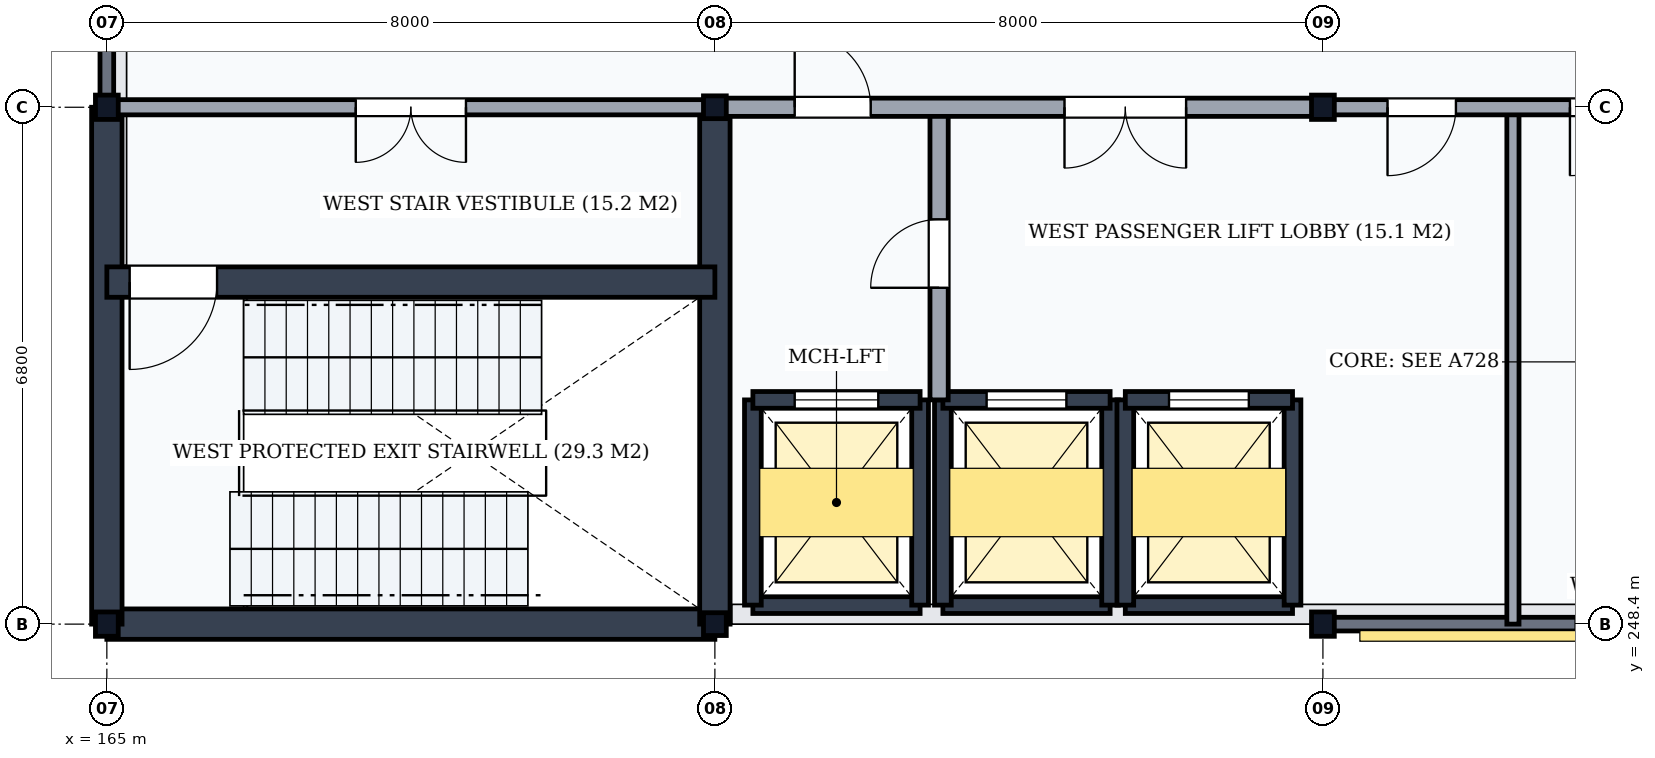
"""IFC4 building model, lengths in metres.
Left out: names, types, materials, properties, quantities, classifications, styles, units other than length and angle.
Written with IfcOpenShell. Run it as: python <this file> out.ifc"""

import sys

from ifc_helpers import new_model, si_unit, direction, frame, frame_2d, origin, origin_2d, place, context, subcontext, project, spatial, rectangle, i_section, extrude, element, fill, save


model = new_model("IFC4")
c1 = context("Model", 3, precision=1e-05, world=origin(), true_north=direction((0.0, 1.0)))
c2 = subcontext(c1, "Body", "Model", "MODEL_VIEW")
j1 = project(units=[si_unit("LENGTHUNIT", "METRE"), si_unit("PLANEANGLEUNIT", "RADIAN")], contexts=[c1])
p1 = place(None, origin())
s1 = spatial("IfcSite", under=j1, at=p1, CompositionType="ELEMENT")
p2 = place(p1, origin())
s2 = spatial("IfcBuilding", under=s1, at=p2, CompositionType="ELEMENT")
p3 = place(p2, frame((0.0, 0.0, 72.3)))
s3 = spatial("IfcBuildingStorey", under=s2, at=p3, CompositionType="ELEMENT", Elevation=72.3)
for number, where, z_axis, x_axis in (
    (1, (165.0, 248.4, 0.0), (0.0, 0.0, 1.0), (1.0, 0.0, 0.0)),
    (2, (165.0, 255.2, 0.0), (0.0, 0.0, 1.0), (1.0, 0.0, 0.0)),
):
    element("IfcColumn", number, at=place(p3, frame(where, z_axis=z_axis, x_axis=x_axis)), inside=s3, PredefinedType="COLUMN", context=c2, shape_type="SweptSolid", body=[
        extrude(i_section(OverallWidth=0.3, OverallDepth=0.32, WebThickness=0.011, FlangeThickness=0.021, FilletRadius=0.027, at=origin_2d()), origin(), (0.0, 0.0, 1.0), 5.4),
    ])
for number, where, z_axis, x_axis in (
    (3, (173.0, 248.4, 0.0), (0.0, 0.0, 1.0), (1.0, 0.0, 0.0)),
    (4, (173.0, 255.2, 0.0), (0.0, 0.0, 1.0), (1.0, 0.0, 0.0)),
):
    element("IfcColumn", number, at=place(p3, frame(where, z_axis=z_axis, x_axis=x_axis)), inside=s3, PredefinedType="COLUMN", context=c2, shape_type="SweptSolid", body=[
        extrude(i_section(OverallWidth=0.3, OverallDepth=0.3, WebThickness=0.011, FlangeThickness=0.019, FilletRadius=0.027, at=origin_2d()), origin(), (0.0, 0.0, 1.0), 5.4),
    ])
for number, where, z_axis, x_axis in (
    (5, (181.0, 248.4, 0.0), (0.0, 0.0, 1.0), (1.0, 0.0, 0.0)),
    (6, (181.0, 255.2, 0.0), (0.0, 0.0, 1.0), (1.0, 0.0, 0.0)),
):
    element("IfcColumn", number, at=place(p3, frame(where, z_axis=z_axis, x_axis=x_axis)), inside=s3, PredefinedType="COLUMN", context=c2, shape_type="SweptSolid", body=[
        extrude(i_section(OverallWidth=0.3, OverallDepth=0.32, WebThickness=0.011, FlangeThickness=0.021, FilletRadius=0.027, at=origin_2d()), origin(), (0.0, 0.0, 1.0), 5.4),
    ])
p4 = place(p3, frame((181.006, 248.4, 0.0), z_axis=(0.0, 0.0, 1.0), x_axis=(1.0, 0.0, 0.0)))
e7 = element("IfcWall", 7, at=p4, inside=s3, PredefinedType="SOLIDWALL", context=c2, shape_type="SweptSolid", body=[
    extrude(rectangle(XDim=7.988, YDim=0.18, at=frame_2d((3.994, 0.0))), origin(), (0.0, 0.0, 1.0), 4.838),
])
p5 = place(p4, frame((3.319, 0.0, 0.85)))
e8 = element("IfcOpeningElement", 8, at=p5, cuts=e7, PredefinedType="OPENING", context=c2, shape_type="SweptSolid", body=[
    extrude(rectangle(XDim=0.75, YDim=2.0, at=frame_2d((0.375, 1.0))), frame((0.0, 0.105, 0.0), z_axis=(0.0, -1.0, 0.0), x_axis=(1.0, 0.0, 0.0)), (0.0, 0.0, 1.0), 0.21),
])
p6 = place(p3, frame((165.0, 255.206, 0.0), z_axis=(0.0, 0.0, 1.0), x_axis=(0.0, 1.0, 0.0)))
e9 = element("IfcWall", 9, at=p6, inside=s3, PredefinedType="SOLIDWALL", context=c2, shape_type="SweptSolid", body=[
    extrude(rectangle(XDim=7.588, YDim=0.18, at=frame_2d((3.794, 0.0))), origin(), (0.0, 0.0, 1.0), 4.878),
])
p7 = place(p3, frame((173.22, 248.53, 5.4), z_axis=(0.0, 0.0, 1.0), x_axis=(1.0, 0.0, 0.0)))
e10 = element("IfcWall", 10, at=p7, inside=s3, PredefinedType="PARAPET", context=c2, shape_type="SweptSolid", body=[
    extrude(rectangle(XDim=23.56, YDim=0.26, at=frame_2d((11.78, 0.0))), origin(), (0.0, 0.0, 1.0), 1.5),
])
p8 = place(p3, frame((165.13, 253.12, 5.4), z_axis=(0.0, 0.0, 1.0), x_axis=(0.0, 1.0, 0.0)))
e11 = element("IfcWall", 11, at=p8, inside=s3, PredefinedType="PARAPET", context=c2, shape_type="SweptSolid", body=[
    extrude(rectangle(XDim=24.62, YDim=0.26, at=frame_2d((12.31, 0.0))), origin(), (0.0, 0.0, 1.0), 1.5),
])
p9 = place(p3, frame((165.0, 248.4, 0.0), z_axis=(0.0, 0.0, 1.0), x_axis=(1.0, 0.0, 0.0)))
e12 = element("IfcWall", 12, at=p9, inside=s3, PredefinedType="SHEAR", context=c2, shape_type="SweptSolid", body=[
    extrude(rectangle(XDim=8.0, YDim=0.4, at=frame_2d((4.0, 0.0))), origin(), (0.0, 0.0, 1.0), 5.15),
])
for number, where, z_axis, x_axis in (
    (13, (165.0, 248.4, 0.0), (0.0, 0.0, 1.0), (0.0, 1.0, 0.0)),
    (14, (173.0, 248.4, 0.0), (0.0, 0.0, 1.0), (0.0, 1.0, 0.0)),
):
    element("IfcWall", number, at=place(p3, frame(where, z_axis=z_axis, x_axis=x_axis)), inside=s3, PredefinedType="SHEAR", context=c2, shape_type="SweptSolid", body=[
        extrude(rectangle(XDim=6.8, YDim=0.4, at=frame_2d((3.4, 0.0))), origin(), (0.0, 0.0, 1.0), 5.15),
    ])
p10 = place(p3, frame((165.0, 252.9, 0.0), z_axis=(0.0, 0.0, 1.0), x_axis=(1.0, 0.0, 0.0)))
e15 = element("IfcWall", 15, at=p10, inside=s3, PredefinedType="SHEAR", context=c2, shape_type="SweptSolid", body=[
    extrude(rectangle(XDim=8.0, YDim=0.4, at=frame_2d((4.0, 0.0))), origin(), (0.0, 0.0, 1.0), 5.15),
])
p11 = place(p10, frame((0.3, 0.0, 0.0)))
e16 = element("IfcOpeningElement", 16, at=p11, cuts=e15, PredefinedType="OPENING", context=c2, shape_type="SweptSolid", body=[
    extrude(rectangle(XDim=1.15, YDim=2.15, at=frame_2d((0.575, 1.075))), frame((0.0, 0.215, 0.0), z_axis=(0.0, -1.0, 0.0), x_axis=(1.0, 0.0, 0.0)), (0.0, 0.0, 1.0), 0.43),
])
p12 = place(p3, frame((165.0, 255.2, 0.0), z_axis=(0.0, 0.0, 1.0), x_axis=(1.0, 0.0, 0.0)))
e17 = element("IfcWall", 17, at=p12, inside=s3, PredefinedType="PARTITIONING", context=c2, shape_type="SweptSolid", body=[
    extrude(rectangle(XDim=8.0, YDim=0.2, at=frame_2d((4.0, 0.0))), origin(), (0.0, 0.0, 1.0), 4.648),
])
p13 = place(p12, frame((3.275, 0.0, 0.0)))
e18 = element("IfcOpeningElement", 18, at=p13, cuts=e17, PredefinedType="OPENING", context=c2, shape_type="SweptSolid", body=[
    extrude(rectangle(XDim=1.45, YDim=2.2, at=frame_2d((0.725, 1.1))), frame((0.0, 0.115, 0.0), z_axis=(0.0, -1.0, 0.0), x_axis=(1.0, 0.0, 0.0)), (0.0, 0.0, 1.0), 0.23),
])
p14 = place(p3, frame((173.5, 248.65, 0.0), z_axis=(0.0, 0.0, 1.0), x_axis=(1.0, 0.0, 0.0)))
e19 = element("IfcWall", 19, at=p14, inside=s3, PredefinedType="SHEAR", context=c2, shape_type="SweptSolid", body=[
    extrude(rectangle(XDim=2.2, YDim=0.22, at=frame_2d((1.1, 0.0))), origin(), (0.0, 0.0, 1.0), 5.15),
])
for number, where, z_axis, x_axis in (
    (20, (173.5, 248.65, 0.0), (0.0, 0.0, 1.0), (0.0, 1.0, 0.0)),
    (21, (175.7, 248.65, 0.0), (0.0, 0.0, 1.0), (0.0, 1.0, 0.0)),
):
    element("IfcWall", number, at=place(p3, frame(where, z_axis=z_axis, x_axis=x_axis)), inside=s3, PredefinedType="SHEAR", context=c2, shape_type="SweptSolid", body=[
        extrude(rectangle(XDim=2.7, YDim=0.22, at=frame_2d((1.35, 0.0))), origin(), (0.0, 0.0, 1.0), 5.15),
    ])
p15 = place(p3, frame((173.5, 251.35, 0.0), z_axis=(0.0, 0.0, 1.0), x_axis=(1.0, 0.0, 0.0)))
e22 = element("IfcWall", 22, at=p15, inside=s3, PredefinedType="SHEAR", context=c2, shape_type="SweptSolid", body=[
    extrude(rectangle(XDim=2.2, YDim=0.22, at=frame_2d((1.1, 0.0))), origin(), (0.0, 0.0, 1.0), 5.15),
])
p16 = place(p15, frame((0.55, 0.0, 0.0)))
e23 = element("IfcOpeningElement", 23, at=p16, cuts=e22, PredefinedType="OPENING", context=c2, shape_type="SweptSolid", body=[
    extrude(rectangle(XDim=1.1, YDim=2.15, at=frame_2d((0.55, 1.075))), frame((0.0, 0.125, 0.0), z_axis=(0.0, -1.0, 0.0), x_axis=(1.0, 0.0, 0.0)), (0.0, 0.0, 1.0), 0.25),
])
p17 = place(p3, frame((176.0, 248.65, 0.0), z_axis=(0.0, 0.0, 1.0), x_axis=(1.0, 0.0, 0.0)))
e24 = element("IfcWall", 24, at=p17, inside=s3, PredefinedType="SHEAR", context=c2, shape_type="SweptSolid", body=[
    extrude(rectangle(XDim=2.2, YDim=0.22, at=frame_2d((1.1, 0.0))), origin(), (0.0, 0.0, 1.0), 5.15),
])
for number, where, z_axis, x_axis in (
    (25, (176.0, 248.65, 0.0), (0.0, 0.0, 1.0), (0.0, 1.0, 0.0)),
    (26, (178.2, 248.65, 0.0), (0.0, 0.0, 1.0), (0.0, 1.0, 0.0)),
):
    element("IfcWall", number, at=place(p3, frame(where, z_axis=z_axis, x_axis=x_axis)), inside=s3, PredefinedType="SHEAR", context=c2, shape_type="SweptSolid", body=[
        extrude(rectangle(XDim=2.7, YDim=0.22, at=frame_2d((1.35, 0.0))), origin(), (0.0, 0.0, 1.0), 5.15),
    ])
p18 = place(p3, frame((176.0, 251.35, 0.0), z_axis=(0.0, 0.0, 1.0), x_axis=(1.0, 0.0, 0.0)))
e27 = element("IfcWall", 27, at=p18, inside=s3, PredefinedType="SHEAR", context=c2, shape_type="SweptSolid", body=[
    extrude(rectangle(XDim=2.2, YDim=0.22, at=frame_2d((1.1, 0.0))), origin(), (0.0, 0.0, 1.0), 5.15),
])
p19 = place(p18, frame((0.575, 0.0, 0.0)))
e28 = element("IfcOpeningElement", 28, at=p19, cuts=e27, PredefinedType="OPENING", context=c2, shape_type="SweptSolid", body=[
    extrude(rectangle(XDim=1.05, YDim=2.15, at=frame_2d((0.525, 1.075))), frame((0.0, 0.125, 0.0), z_axis=(0.0, -1.0, 0.0), x_axis=(1.0, 0.0, 0.0)), (0.0, 0.0, 1.0), 0.25),
])
p20 = place(p3, frame((178.4, 248.65, 0.0), z_axis=(0.0, 0.0, 1.0), x_axis=(1.0, 0.0, 0.0)))
e29 = element("IfcWall", 29, at=p20, inside=s3, PredefinedType="SHEAR", context=c2, shape_type="SweptSolid", body=[
    extrude(rectangle(XDim=2.2, YDim=0.22, at=frame_2d((1.1, 0.0))), origin(), (0.0, 0.0, 1.0), 5.15),
])
for number, where, z_axis, x_axis in (
    (30, (178.4, 248.65, 0.0), (0.0, 0.0, 1.0), (0.0, 1.0, 0.0)),
    (31, (180.6, 248.65, 0.0), (0.0, 0.0, 1.0), (0.0, 1.0, 0.0)),
):
    element("IfcWall", number, at=place(p3, frame(where, z_axis=z_axis, x_axis=x_axis)), inside=s3, PredefinedType="SHEAR", context=c2, shape_type="SweptSolid", body=[
        extrude(rectangle(XDim=2.7, YDim=0.22, at=frame_2d((1.35, 0.0))), origin(), (0.0, 0.0, 1.0), 5.15),
    ])
p21 = place(p3, frame((178.4, 251.35, 0.0), z_axis=(0.0, 0.0, 1.0), x_axis=(1.0, 0.0, 0.0)))
e32 = element("IfcWall", 32, at=p21, inside=s3, PredefinedType="SHEAR", context=c2, shape_type="SweptSolid", body=[
    extrude(rectangle(XDim=2.2, YDim=0.22, at=frame_2d((1.1, 0.0))), origin(), (0.0, 0.0, 1.0), 5.15),
])
p22 = place(p21, frame((0.575, 0.0, 0.0)))
e33 = element("IfcOpeningElement", 33, at=p22, cuts=e32, PredefinedType="OPENING", context=c2, shape_type="SweptSolid", body=[
    extrude(rectangle(XDim=1.05, YDim=2.15, at=frame_2d((0.525, 1.075))), frame((0.0, 0.125, 0.0), z_axis=(0.0, -1.0, 0.0), x_axis=(1.0, 0.0, 0.0)), (0.0, 0.0, 1.0), 0.25),
])
p23 = place(p3, frame((175.95, 251.35, 0.0), z_axis=(0.0, 0.0, 1.0), x_axis=(0.0, 1.0, 0.0)))
e34 = element("IfcWall", 34, at=p23, inside=s3, PredefinedType="PARTITIONING", context=c2, shape_type="SweptSolid", body=[
    extrude(rectangle(XDim=3.85, YDim=0.24, at=frame_2d((1.925, 0.0))), origin(), (0.0, 0.0, 1.0), 5.15),
])
p24 = place(p23, frame((1.475, 0.0, 0.0)))
e35 = element("IfcOpeningElement", 35, at=p24, cuts=e34, PredefinedType="OPENING", context=c2, shape_type="SweptSolid", body=[
    extrude(rectangle(XDim=0.9, YDim=2.1, at=frame_2d((0.45, 1.05))), frame((0.0, 0.135, 0.0), z_axis=(0.0, -1.0, 0.0), x_axis=(1.0, 0.0, 0.0)), (0.0, 0.0, 1.0), 0.27),
])
p25 = place(p3, frame((183.5, 248.4, 0.0), z_axis=(0.0, 0.0, 1.0), x_axis=(0.0, 1.0, 0.0)))
e36 = element("IfcWall", 36, at=p25, inside=s3, PredefinedType="PARTITIONING", context=c2, shape_type="SweptSolid", body=[
    extrude(rectangle(XDim=6.8, YDim=0.16, at=frame_2d((3.4, 0.0))), origin(), (0.0, 0.0, 1.0), 5.15),
])
p26 = place(p3, frame((173.0, 255.2, 0.0), z_axis=(0.0, 0.0, 1.0), x_axis=(1.0, 0.0, 0.0)))
e37 = element("IfcWall", 37, at=p26, inside=s3, PredefinedType="PARTITIONING", context=c2, shape_type="SweptSolid", body=[
    extrude(rectangle(XDim=8.0, YDim=0.24, at=frame_2d((4.0, 0.0))), origin(), (0.0, 0.0, 1.0), 4.648),
])
p27 = place(p26, frame((1.05, 0.0, 0.0)))
e38 = element("IfcOpeningElement", 38, at=p27, cuts=e37, PredefinedType="OPENING", context=c2, shape_type="SweptSolid", body=[
    extrude(rectangle(XDim=1.0, YDim=2.1, at=frame_2d((0.5, 1.05))), frame((0.0, 0.135, 0.0), z_axis=(0.0, -1.0, 0.0), x_axis=(1.0, 0.0, 0.0)), (0.0, 0.0, 1.0), 0.27),
])
p28 = place(p26, frame((4.6, 0.0, 0.0)))
e39 = element("IfcOpeningElement", 39, at=p28, cuts=e37, PredefinedType="OPENING", context=c2, shape_type="SweptSolid", body=[
    extrude(rectangle(XDim=1.6, YDim=2.25, at=frame_2d((0.8, 1.125))), frame((0.0, 0.135, 0.0), z_axis=(0.0, -1.0, 0.0), x_axis=(1.0, 0.0, 0.0)), (0.0, 0.0, 1.0), 0.27),
])
p29 = place(p3, frame((181.0, 255.2, 0.0), z_axis=(0.0, 0.0, 1.0), x_axis=(1.0, 0.0, 0.0)))
e40 = element("IfcWall", 40, at=p29, inside=s3, PredefinedType="PARTITIONING", context=c2, shape_type="SweptSolid", body=[
    extrude(rectangle(XDim=8.0, YDim=0.2, at=frame_2d((4.0, 0.0))), origin(), (0.0, 0.0, 1.0), 4.648),
])
p30 = place(p29, frame((0.85, 0.0, 0.0)))
e41 = element("IfcOpeningElement", 41, at=p30, cuts=e40, PredefinedType="OPENING", context=c2, shape_type="SweptSolid", body=[
    extrude(rectangle(XDim=0.9, YDim=2.1, at=frame_2d((0.45, 1.05))), frame((0.0, 0.115, 0.0), z_axis=(0.0, -1.0, 0.0), x_axis=(1.0, 0.0, 0.0)), (0.0, 0.0, 1.0), 0.23),
])
p31 = place(p29, frame((3.25, 0.0, 0.0)))
e42 = element("IfcOpeningElement", 42, at=p31, cuts=e40, PredefinedType="OPENING", context=c2, shape_type="SweptSolid", body=[
    extrude(rectangle(XDim=0.9, YDim=2.1, at=frame_2d((0.45, 1.05))), frame((0.0, 0.115, 0.0), z_axis=(0.0, -1.0, 0.0), x_axis=(1.0, 0.0, 0.0)), (0.0, 0.0, 1.0), 0.23),
])
p32 = place(p29, frame((5.075, 0.0, 0.0)))
e43 = element("IfcOpeningElement", 43, at=p32, cuts=e40, PredefinedType="OPENING", context=c2, shape_type="SweptSolid", body=[
    extrude(rectangle(XDim=0.95, YDim=2.1, at=frame_2d((0.475, 1.05))), frame((0.0, 0.115, 0.0), z_axis=(0.0, -1.0, 0.0), x_axis=(1.0, 0.0, 0.0)), (0.0, 0.0, 1.0), 0.23),
])
p33 = place(p29, frame((6.5, 0.0, 0.0)))
e44 = element("IfcOpeningElement", 44, at=p33, cuts=e40, PredefinedType="OPENING", context=c2, shape_type="SweptSolid", body=[
    extrude(rectangle(XDim=0.85, YDim=2.1, at=frame_2d((0.425, 1.05))), frame((0.0, 0.115, 0.0), z_axis=(0.0, -1.0, 0.0), x_axis=(1.0, 0.0, 0.0)), (0.0, 0.0, 1.0), 0.23),
])
p34 = place(p11, frame((1.15, 0.0, 0.0), z_axis=(0.0, 0.0, 1.0), x_axis=(-1.0, 0.0, 0.0)))
e45 = element("IfcDoor", 45, at=p34, inside=s3, OperationType="SINGLE_SWING_RIGHT", PredefinedType="DOOR", context=c2, shape_type="SweptSolid", body=[
    extrude(rectangle(XDim=1.15, YDim=2.15, at=frame_2d((0.575, 1.075))), frame((0.0, 0.025, 0.0), z_axis=(0.0, -1.0, 0.0), x_axis=(1.0, 0.0, 0.0)), (0.0, 0.0, 1.0), 0.05),
])
fill(e16, e45)
p35 = place(p13, frame((1.45, 0.0, 0.0), z_axis=(0.0, 0.0, 1.0), x_axis=(-1.0, 0.0, 0.0)))
e46 = element("IfcDoor", 46, at=p35, inside=s3, OperationType="DOUBLE_DOOR_SINGLE_SWING", PredefinedType="DOOR", context=c2, shape_type="SweptSolid", body=[
    extrude(rectangle(XDim=1.45, YDim=2.2, at=frame_2d((0.725, 1.1))), frame((0.0, 0.025, 0.0), z_axis=(0.0, -1.0, 0.0), x_axis=(1.0, 0.0, 0.0)), (0.0, 0.0, 1.0), 0.05),
])
fill(e18, e46)
p36 = place(p16, origin())
e47 = element("IfcDoor", 47, at=p36, inside=s3, OperationType="DOUBLE_DOOR_SLIDING", PredefinedType="USERDEFINED", context=c2, shape_type="SweptSolid", body=[
    extrude(rectangle(XDim=1.1, YDim=2.15, at=frame_2d((0.55, 1.075))), frame((0.0, 0.025, 0.0), z_axis=(0.0, -1.0, 0.0), x_axis=(1.0, 0.0, 0.0)), (0.0, 0.0, 1.0), 0.05),
])
fill(e23, e47)
p37 = place(p19, origin())
e48 = element("IfcDoor", 48, at=p37, inside=s3, OperationType="DOUBLE_DOOR_SLIDING", PredefinedType="USERDEFINED", context=c2, shape_type="SweptSolid", body=[
    extrude(rectangle(XDim=1.05, YDim=2.15, at=frame_2d((0.525, 1.075))), frame((0.0, 0.025, 0.0), z_axis=(0.0, -1.0, 0.0), x_axis=(1.0, 0.0, 0.0)), (0.0, 0.0, 1.0), 0.05),
])
fill(e28, e48)
p38 = place(p22, origin())
e49 = element("IfcDoor", 49, at=p38, inside=s3, OperationType="DOUBLE_DOOR_SLIDING", PredefinedType="USERDEFINED", context=c2, shape_type="SweptSolid", body=[
    extrude(rectangle(XDim=1.05, YDim=2.15, at=frame_2d((0.525, 1.075))), frame((0.0, 0.025, 0.0), z_axis=(0.0, -1.0, 0.0), x_axis=(1.0, 0.0, 0.0)), (0.0, 0.0, 1.0), 0.05),
])
fill(e33, e49)
p39 = place(p24, origin())
e50 = element("IfcDoor", 50, at=p39, inside=s3, OperationType="SINGLE_SWING_LEFT", PredefinedType="DOOR", context=c2, shape_type="SweptSolid", body=[
    extrude(rectangle(XDim=0.9, YDim=2.1, at=frame_2d((0.45, 1.05))), frame((0.0, 0.025, 0.0), z_axis=(0.0, -1.0, 0.0), x_axis=(1.0, 0.0, 0.0)), (0.0, 0.0, 1.0), 0.05),
])
fill(e35, e50)
p40 = place(p27, origin())
e51 = element("IfcDoor", 51, at=p40, inside=s3, OperationType="SINGLE_SWING_LEFT", PredefinedType="DOOR", context=c2, shape_type="SweptSolid", body=[
    extrude(rectangle(XDim=1.0, YDim=2.1, at=frame_2d((0.5, 1.05))), frame((0.0, 0.025, 0.0), z_axis=(0.0, -1.0, 0.0), x_axis=(1.0, 0.0, 0.0)), (0.0, 0.0, 1.0), 0.05),
])
fill(e38, e51)
p41 = place(p28, frame((1.6, 0.0, 0.0), z_axis=(0.0, 0.0, 1.0), x_axis=(-1.0, 0.0, 0.0)))
e52 = element("IfcDoor", 52, at=p41, inside=s3, OperationType="DOUBLE_DOOR_SINGLE_SWING", PredefinedType="DOOR", context=c2, shape_type="SweptSolid", body=[
    extrude(rectangle(XDim=1.6, YDim=2.25, at=frame_2d((0.8, 1.125))), frame((0.0, 0.025, 0.0), z_axis=(0.0, -1.0, 0.0), x_axis=(1.0, 0.0, 0.0)), (0.0, 0.0, 1.0), 0.05),
])
fill(e39, e52)
p42 = place(p30, frame((0.9, 0.0, 0.0), z_axis=(0.0, 0.0, 1.0), x_axis=(-1.0, 0.0, 0.0)))
e53 = element("IfcDoor", 53, at=p42, inside=s3, OperationType="SINGLE_SWING_RIGHT", PredefinedType="DOOR", context=c2, shape_type="SweptSolid", body=[
    extrude(rectangle(XDim=0.9, YDim=2.1, at=frame_2d((0.45, 1.05))), frame((0.0, 0.025, 0.0), z_axis=(0.0, -1.0, 0.0), x_axis=(1.0, 0.0, 0.0)), (0.0, 0.0, 1.0), 0.05),
])
fill(e41, e53)
p43 = place(p31, frame((0.9, 0.0, 0.0), z_axis=(0.0, 0.0, 1.0), x_axis=(-1.0, 0.0, 0.0)))
e54 = element("IfcDoor", 54, at=p43, inside=s3, OperationType="SINGLE_SWING_RIGHT", PredefinedType="DOOR", context=c2, shape_type="SweptSolid", body=[
    extrude(rectangle(XDim=0.9, YDim=2.1, at=frame_2d((0.45, 1.05))), frame((0.0, 0.025, 0.0), z_axis=(0.0, -1.0, 0.0), x_axis=(1.0, 0.0, 0.0)), (0.0, 0.0, 1.0), 0.05),
])
fill(e42, e54)
save(model, sys.argv[1])
